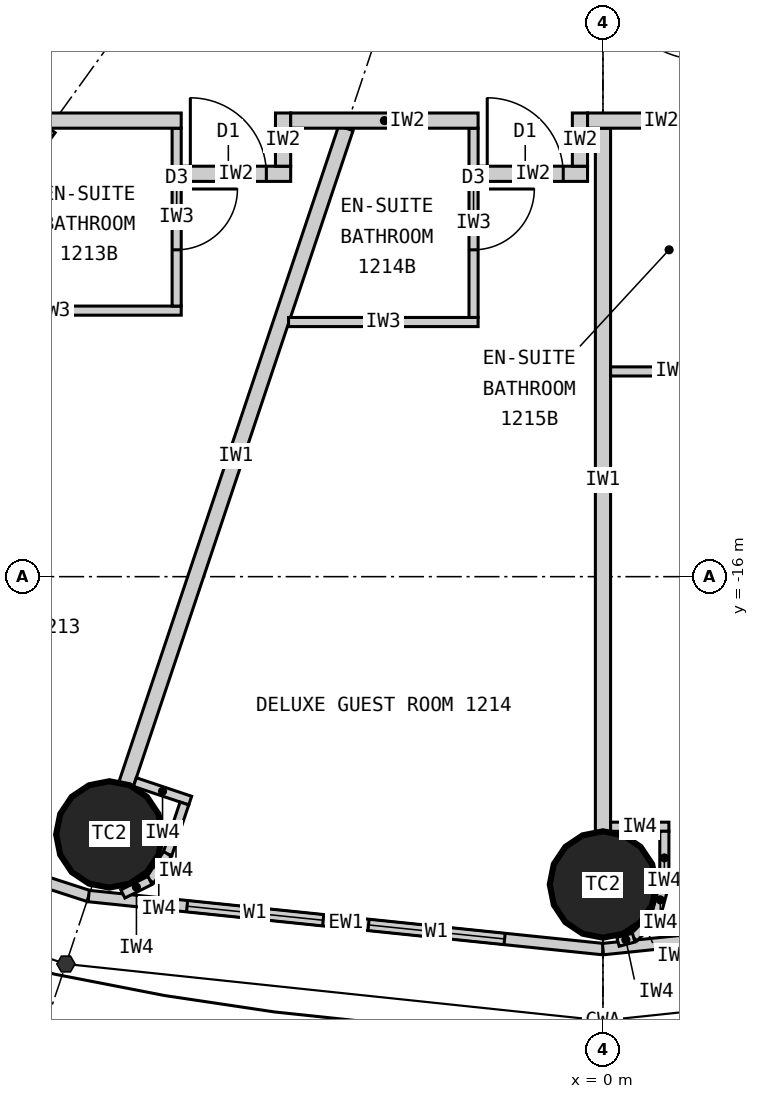
"""IFC4 building model, lengths in metres.
Left out: names, types, materials, properties, quantities, classifications, styles, units other than length and angle.
Written with IfcOpenShell. Run it as: python <this file> out.ifc"""

import sys

from ifc_helpers import new_model, si_unit, direction, frame, frame_2d, origin, origin_2d, place, context, subcontext, project, spatial, rectangle, circle, extrude, element, fill, save


model = new_model("IFC4")
c1 = context("Model", 3, precision=1e-05, world=origin(), true_north=direction((0.0, 1.0)))
c2 = subcontext(c1, "Body", "Model", "MODEL_VIEW")
j1 = project(units=[si_unit("LENGTHUNIT", "METRE"), si_unit("PLANEANGLEUNIT", "RADIAN")], contexts=[c1])
p1 = place(None, origin())
s1 = spatial("IfcSite", under=j1, at=p1, CompositionType="ELEMENT")
p2 = place(p1, origin())
s2 = spatial("IfcBuilding", under=s1, at=p2, CompositionType="ELEMENT")
p3 = place(p2, frame((0.0, 0.0, 54.0)))
s3 = spatial("IfcBuildingStorey", under=s2, at=p3, CompositionType="ELEMENT", Elevation=54.0)
for number, where, z_axis, x_axis in (
    (1, (-6.495, -19.391, 0.0), (0.0, 0.0, 1.0), (1.0, 0.0, 0.0)),
    (2, (0.0, -20.05, 0.0), (0.0, 0.0, 1.0), (1.0, 0.0, 0.0)),
):
    element("IfcColumn", number, at=place(p3, frame(where, z_axis=z_axis, x_axis=x_axis)), inside=s3, PredefinedType="COLUMN", context=c2, shape_type="SweptSolid", body=[
        extrude(circle(Radius=0.7, at=origin_2d()), origin(), (0.0, 0.0, 1.0), 3.3),
    ])
p4 = place(p3, frame((-13.096, -18.147, 0.0), z_axis=(0.0, 0.0, 1.0), x_axis=(0.951137534625, -0.308767534285, 0.0)))
e3 = element("IfcWall", 3, at=p4, inside=s3, PredefinedType="ELEMENTEDWALL", context=c2, shape_type="SweptSolid", body=[
    extrude(rectangle(XDim=6.655, YDim=0.15, at=frame_2d((3.328, 0.0))), origin(), (0.0, 0.0, 1.0), 3.12),
])
p5 = place(p4, frame((1.228, 0.0, 0.9)))
e4 = element("IfcOpeningElement", 4, at=p5, cuts=e3, PredefinedType="OPENING", context=c2, shape_type="SweptSolid", body=[
    extrude(rectangle(XDim=1.8, YDim=1.9, at=frame_2d((0.9, 0.95))), frame((0.0, 0.085, 0.0), z_axis=(0.0, -1.0, 0.0), x_axis=(1.0, 0.0, 0.0)), (0.0, 0.0, 1.0), 0.17),
])
p6 = place(p4, frame((3.628, 0.0, 0.9)))
e5 = element("IfcOpeningElement", 5, at=p6, cuts=e3, PredefinedType="OPENING", context=c2, shape_type="SweptSolid", body=[
    extrude(rectangle(XDim=1.8, YDim=1.9, at=frame_2d((0.9, 0.95))), frame((0.0, 0.085, 0.0), z_axis=(0.0, -1.0, 0.0), x_axis=(1.0, 0.0, 0.0)), (0.0, 0.0, 1.0), 0.17),
])
p7 = place(p3, frame((-6.766, -20.202, 0.0), z_axis=(0.0, 0.0, 1.0), x_axis=(0.994721394369, -0.102612609291, 0.0)))
e6 = element("IfcWall", 6, at=p7, inside=s3, PredefinedType="ELEMENTEDWALL", context=c2, shape_type="SweptSolid", body=[
    extrude(rectangle(XDim=6.802, YDim=0.15, at=frame_2d((3.401, 0.0))), origin(), (0.0, 0.0, 1.0), 3.12),
])
p8 = place(p7, frame((1.301, 0.0, 0.9)))
e7 = element("IfcOpeningElement", 7, at=p8, cuts=e6, PredefinedType="OPENING", context=c2, shape_type="SweptSolid", body=[
    extrude(rectangle(XDim=1.8, YDim=1.9, at=frame_2d((0.9, 0.95))), frame((0.0, 0.085, 0.0), z_axis=(0.0, -1.0, 0.0), x_axis=(1.0, 0.0, 0.0)), (0.0, 0.0, 1.0), 0.17),
])
p9 = place(p7, frame((3.701, 0.0, 0.9)))
e8 = element("IfcOpeningElement", 8, at=p9, cuts=e6, PredefinedType="OPENING", context=c2, shape_type="SweptSolid", body=[
    extrude(rectangle(XDim=1.8, YDim=1.9, at=frame_2d((0.9, 0.95))), frame((0.0, 0.085, 0.0), z_axis=(0.0, -1.0, 0.0), x_axis=(1.0, 0.0, 0.0)), (0.0, 0.0, 1.0), 0.17),
])
p10 = place(p3, frame((0.0, -20.9, 0.0), z_axis=(0.0, 0.0, 1.0), x_axis=(0.994721394369, 0.102612609291, 0.0)))
e9 = element("IfcWall", 9, at=p10, inside=s3, PredefinedType="ELEMENTEDWALL", context=c2, shape_type="SweptSolid", body=[
    extrude(rectangle(XDim=6.802, YDim=0.15, at=frame_2d((3.401, 0.0))), origin(), (0.0, 0.0, 1.0), 3.12),
])
p11 = place(p10, frame((1.301, 0.0, 0.9)))
e10 = element("IfcOpeningElement", 10, at=p11, cuts=e9, PredefinedType="OPENING", context=c2, shape_type="SweptSolid", body=[
    extrude(rectangle(XDim=1.8, YDim=1.9, at=frame_2d((0.9, 0.95))), frame((0.0, 0.085, 0.0), z_axis=(0.0, -1.0, 0.0), x_axis=(1.0, 0.0, 0.0)), (0.0, 0.0, 1.0), 0.17),
])
p12 = place(p10, frame((3.701, 0.0, 0.9)))
e11 = element("IfcOpeningElement", 11, at=p12, cuts=e9, PredefinedType="OPENING", context=c2, shape_type="SweptSolid", body=[
    extrude(rectangle(XDim=1.8, YDim=1.9, at=frame_2d((0.9, 0.95))), frame((0.0, 0.085, 0.0), z_axis=(0.0, -1.0, 0.0), x_axis=(1.0, 0.0, 0.0)), (0.0, 0.0, 1.0), 0.17),
])
p13 = place(p3, frame((-7.289, -10.1, 0.0), z_axis=(0.0, 0.0, 1.0), x_axis=(-0.585198353053, -0.810890182197, 0.0)))
e12 = element("IfcWall", 12, at=p13, inside=s3, PredefinedType="PARTITIONING", context=c2, shape_type="SweptSolid", body=[
    extrude(rectangle(XDim=8.36, YDim=0.2, at=frame_2d((4.18, 0.0))), origin(), (0.0, 0.0, 1.0), 2.32),
])
p14 = place(p3, frame((-3.383, -10.1, 0.0), z_axis=(0.0, 0.0, 1.0), x_axis=(-0.31759592231, -0.948226149256, 0.0)))
e13 = element("IfcWall", 13, at=p14, inside=s3, PredefinedType="PARTITIONING", context=c2, shape_type="SweptSolid", body=[
    extrude(rectangle(XDim=9.098, YDim=0.2, at=frame_2d((4.549, 0.0))), origin(), (0.0, 0.0, 1.0), 2.32),
])
p15 = place(p3, frame((0.0, -10.1, 0.0), z_axis=(0.0, 0.0, 1.0), x_axis=(0.0, -1.0, 0.0)))
e14 = element("IfcWall", 14, at=p15, inside=s3, PredefinedType="PARTITIONING", context=c2, shape_type="SweptSolid", body=[
    extrude(rectangle(XDim=9.25, YDim=0.2, at=frame_2d((4.625, 0.0))), origin(), (0.0, 0.0, 1.0), 2.32),
])
p16 = place(p3, frame((-8.921, -12.5, 0.0), z_axis=(0.0, 0.0, 1.0), x_axis=(1.0, 0.0, 0.0)))
e15 = element("IfcWall", 15, at=p16, inside=s3, PredefinedType="PARTITIONING", context=c2, shape_type="SweptSolid", body=[
    extrude(rectangle(XDim=3.372, YDim=0.12, at=frame_2d((1.686, 0.0))), origin(), (0.0, 0.0, 1.0), 3.12),
])
p17 = place(p3, frame((-5.609, -10.1, 0.0), z_axis=(0.0, 0.0, 1.0), x_axis=(0.0, -1.0, 0.0)))
e16 = element("IfcWall", 16, at=p17, inside=s3, PredefinedType="PARTITIONING", context=c2, shape_type="SweptSolid", body=[
    extrude(rectangle(XDim=2.34, YDim=0.12, at=frame_2d((1.17, 0.0))), origin(), (0.0, 0.0, 1.0), 3.12),
])
p18 = place(p17, frame((0.8, 0.0, 0.0)))
e17 = element("IfcOpeningElement", 17, at=p18, cuts=e16, PredefinedType="OPENING", context=c2, shape_type="SweptSolid", body=[
    extrude(rectangle(XDim=0.8, YDim=2.1, at=frame_2d((0.4, 1.05))), frame((0.0, 0.07, 0.0), z_axis=(0.0, -1.0, 0.0), x_axis=(1.0, 0.0, 0.0)), (0.0, 0.0, 1.0), 0.14),
])
p19 = place(p3, frame((-4.137, -12.65, 0.0), z_axis=(0.0, 0.0, 1.0), x_axis=(1.0, 0.0, 0.0)))
e18 = element("IfcWall", 18, at=p19, inside=s3, PredefinedType="PARTITIONING", context=c2, shape_type="SweptSolid", body=[
    extrude(rectangle(XDim=2.494, YDim=0.12, at=frame_2d((1.247, 0.0))), origin(), (0.0, 0.0, 1.0), 3.12),
])
p20 = place(p3, frame((-1.703, -10.1, 0.0), z_axis=(0.0, 0.0, 1.0), x_axis=(0.0, -1.0, 0.0)))
e19 = element("IfcWall", 19, at=p20, inside=s3, PredefinedType="PARTITIONING", context=c2, shape_type="SweptSolid", body=[
    extrude(rectangle(XDim=2.49, YDim=0.12, at=frame_2d((1.245, 0.0))), origin(), (0.0, 0.0, 1.0), 3.12),
])
p21 = place(p20, frame((0.8, 0.0, 0.0)))
e20 = element("IfcOpeningElement", 20, at=p21, cuts=e19, PredefinedType="OPENING", context=c2, shape_type="SweptSolid", body=[
    extrude(rectangle(XDim=0.8, YDim=2.1, at=frame_2d((0.4, 1.05))), frame((0.0, 0.07, 0.0), z_axis=(0.0, -1.0, 0.0), x_axis=(1.0, 0.0, 0.0)), (0.0, 0.0, 1.0), 0.14),
])
p22 = place(p3, frame((0.1, -13.3, 0.0), z_axis=(0.0, 0.0, 1.0), x_axis=(1.0, 0.0, 0.0)))
e21 = element("IfcWall", 21, at=p22, inside=s3, PredefinedType="PARTITIONING", context=c2, shape_type="SweptSolid", body=[
    extrude(rectangle(XDim=1.64, YDim=0.12, at=frame_2d((0.82, 0.0))), origin(), (0.0, 0.0, 1.0), 3.12),
])
p23 = place(p3, frame((-4.109, -10.7, 0.0), z_axis=(0.0, 0.0, 1.0), x_axis=(-1.0, 0.0, 0.0)))
e22 = element("IfcWall", 22, at=p23, inside=s3, PredefinedType="PARTITIONING", context=c2, shape_type="SweptSolid", body=[
    extrude(rectangle(XDim=1.44, YDim=0.2, at=frame_2d((0.72, 0.0))), origin(), (0.0, 0.0, 1.0), 3.12),
])
p24 = place(p23, frame((0.32, 0.0, 0.0)))
e23 = element("IfcOpeningElement", 23, at=p24, cuts=e22, PredefinedType="OPENING", context=c2, shape_type="SweptSolid", body=[
    extrude(rectangle(XDim=1.0, YDim=2.2, at=frame_2d((0.5, 1.1))), frame((0.0, 0.11, 0.0), z_axis=(0.0, -1.0, 0.0), x_axis=(1.0, 0.0, 0.0)), (0.0, 0.0, 1.0), 0.22),
])
p25 = place(p3, frame((-4.209, -9.9, 0.0), z_axis=(0.0, 0.0, 1.0), x_axis=(0.0, -1.0, 0.0)))
e24 = element("IfcWall", 24, at=p25, inside=s3, PredefinedType="PARTITIONING", context=c2, shape_type="SweptSolid", body=[
    extrude(rectangle(XDim=0.7, YDim=0.2, at=frame_2d((0.35, 0.0))), origin(), (0.0, 0.0, 1.0), 3.12),
])
p26 = place(p3, frame((-0.203, -10.7, 0.0), z_axis=(0.0, 0.0, 1.0), x_axis=(-1.0, 0.0, 0.0)))
e25 = element("IfcWall", 25, at=p26, inside=s3, PredefinedType="PARTITIONING", context=c2, shape_type="SweptSolid", body=[
    extrude(rectangle(XDim=1.44, YDim=0.2, at=frame_2d((0.72, 0.0))), origin(), (0.0, 0.0, 1.0), 3.12),
])
p27 = place(p26, frame((0.32, 0.0, 0.0)))
e26 = element("IfcOpeningElement", 26, at=p27, cuts=e25, PredefinedType="OPENING", context=c2, shape_type="SweptSolid", body=[
    extrude(rectangle(XDim=1.0, YDim=2.2, at=frame_2d((0.5, 1.1))), frame((0.0, 0.11, 0.0), z_axis=(0.0, -1.0, 0.0), x_axis=(1.0, 0.0, 0.0)), (0.0, 0.0, 1.0), 0.22),
])
p28 = place(p3, frame((-0.303, -9.9, 0.0), z_axis=(0.0, 0.0, 1.0), x_axis=(0.0, -1.0, 0.0)))
e27 = element("IfcWall", 27, at=p28, inside=s3, PredefinedType="PARTITIONING", context=c2, shape_type="SweptSolid", body=[
    extrude(rectangle(XDim=0.7, YDim=0.2, at=frame_2d((0.35, 0.0))), origin(), (0.0, 0.0, 1.0), 3.12),
])
p29 = place(p3, frame((1.74, -10.0, 0.0), z_axis=(0.0, 0.0, 1.0), x_axis=(-1.0, 0.0, 0.0)))
e28 = element("IfcWall", 28, at=p29, inside=s3, PredefinedType="PARTITIONING", context=c2, shape_type="SweptSolid", body=[
    extrude(rectangle(XDim=1.943, YDim=0.2, at=frame_2d((0.971, 0.0))), origin(), (0.0, 0.0, 1.0), 3.12),
])
p30 = place(p3, frame((-1.643, -10.0, 0.0), z_axis=(0.0, 0.0, 1.0), x_axis=(-1.0, 0.0, 0.0)))
e29 = element("IfcWall", 29, at=p30, inside=s3, PredefinedType="PARTITIONING", context=c2, shape_type="SweptSolid", body=[
    extrude(rectangle(XDim=2.466, YDim=0.2, at=frame_2d((1.233, 0.0))), origin(), (0.0, 0.0, 1.0), 3.12),
])
p31 = place(p3, frame((-5.549, -10.0, 0.0), z_axis=(0.0, 0.0, 1.0), x_axis=(-1.0, 0.0, 0.0)))
e30 = element("IfcWall", 30, at=p31, inside=s3, PredefinedType="PARTITIONING", context=c2, shape_type="SweptSolid", body=[
    extrude(rectangle(XDim=3.896, YDim=0.2, at=frame_2d((1.948, 0.0))), origin(), (0.0, 0.0, 1.0), 3.12),
])
p32 = place(p3, frame((-6.159, -18.702, 0.0), z_axis=(0.0, 0.0, 1.0), x_axis=(0.948173154049, -0.31775410295, 0.0)))
e31 = element("IfcWall", 31, at=p32, inside=s3, PredefinedType="PARTITIONING", context=c2, shape_type="SweptSolid", body=[
    extrude(rectangle(XDim=0.768, YDim=0.12, at=frame_2d((0.384, 0.0))), origin(), (0.0, 0.0, 1.0), 3.12),
])
p33 = place(p3, frame((-5.507, -18.984, 0.0), z_axis=(0.0, 0.0, 1.0), x_axis=(-0.317692050622, -0.948193946918, 0.0)))
e32 = element("IfcWall", 32, at=p33, inside=s3, PredefinedType="PARTITIONING", context=c2, shape_type="SweptSolid", body=[
    extrude(rectangle(XDim=0.7, YDim=0.12, at=frame_2d((0.35, 0.0))), origin(), (0.0, 0.0, 1.0), 3.12),
])
p34 = place(p3, frame((-5.729, -19.648, 0.0), z_axis=(0.0, 0.0, 1.0), x_axis=(-0.552135764955, -0.833754218615, 0.0)))
e33 = element("IfcWall", 33, at=p34, inside=s3, PredefinedType="PARTITIONING", context=c2, shape_type="SweptSolid", body=[
    extrude(rectangle(XDim=0.418, YDim=0.12, at=frame_2d((0.209, 0.0))), origin(), (0.0, 0.0, 1.0), 3.12),
])
p35 = place(p3, frame((-5.96, -19.996, 0.0), z_axis=(0.0, 0.0, 1.0), x_axis=(-0.895160725913, -0.445743507842, 0.0)))
e34 = element("IfcWall", 34, at=p35, inside=s3, PredefinedType="PARTITIONING", context=c2, shape_type="SweptSolid", body=[
    extrude(rectangle(XDim=0.399, YDim=0.12, at=frame_2d((0.199, 0.0))), origin(), (0.0, 0.0, 1.0), 3.12),
])
p36 = place(p3, frame((0.1, -19.29, 0.0), z_axis=(0.0, 0.0, 1.0), x_axis=(1.0, 0.0, 0.0)))
e35 = element("IfcWall", 35, at=p36, inside=s3, PredefinedType="PARTITIONING", context=c2, shape_type="SweptSolid", body=[
    extrude(rectangle(XDim=0.767, YDim=0.12, at=frame_2d((0.384, 0.0))), origin(), (0.0, 0.0, 1.0), 3.12),
])
p37 = place(p3, frame((0.808, -19.35, 0.0), z_axis=(0.0, 0.0, 1.0), x_axis=(0.0, -1.0, 0.0)))
e36 = element("IfcWall", 36, at=p37, inside=s3, PredefinedType="PARTITIONING", context=c2, shape_type="SweptSolid", body=[
    extrude(rectangle(XDim=0.7, YDim=0.12, at=frame_2d((0.35, 0.0))), origin(), (0.0, 0.0, 1.0), 3.12),
])
p38 = place(p3, frame((0.808, -20.05, 0.0), z_axis=(0.0, 0.0, 1.0), x_axis=(-0.2592614205, -0.965807183573, 0.0)))
e37 = element("IfcWall", 37, at=p38, inside=s3, PredefinedType="PARTITIONING", context=c2, shape_type="SweptSolid", body=[
    extrude(rectangle(XDim=0.418, YDim=0.12, at=frame_2d((0.209, 0.0))), origin(), (0.0, 0.0, 1.0), 3.12),
])
p39 = place(p3, frame((0.699, -20.454, 0.0), z_axis=(0.0, 0.0, 1.0), x_axis=(-0.707106781187, -0.707106781187, 0.0)))
e38 = element("IfcWall", 38, at=p39, inside=s3, PredefinedType="PARTITIONING", context=c2, shape_type="SweptSolid", body=[
    extrude(rectangle(XDim=0.418, YDim=0.12, at=frame_2d((0.209, 0.0))), origin(), (0.0, 0.0, 1.0), 3.12),
])
p40 = place(p3, frame((0.404, -20.749, 0.0), z_axis=(0.0, 0.0, 1.0), x_axis=(-0.965759066438, -0.25944060128, 0.0)))
e39 = element("IfcWall", 39, at=p40, inside=s3, PredefinedType="PARTITIONING", context=c2, shape_type="SweptSolid", body=[
    extrude(rectangle(XDim=0.214, YDim=0.12, at=frame_2d((0.107, 0.0))), origin(), (0.0, 0.0, 1.0), 3.12),
])
p41 = place(p8, origin())
e40 = element("IfcWindow", 40, at=p41, inside=s3, PartitioningType="SINGLE_PANEL", PredefinedType="WINDOW", context=c2, shape_type="SweptSolid", body=[
    extrude(rectangle(XDim=1.8, YDim=1.9, at=frame_2d((0.9, 0.95))), frame((0.0, 0.03, 0.0), z_axis=(0.0, -1.0, 0.0), x_axis=(1.0, 0.0, 0.0)), (0.0, 0.0, 1.0), 0.06),
])
fill(e7, e40)
p42 = place(p9, origin())
e41 = element("IfcWindow", 41, at=p42, inside=s3, PartitioningType="SINGLE_PANEL", PredefinedType="WINDOW", context=c2, shape_type="SweptSolid", body=[
    extrude(rectangle(XDim=1.8, YDim=1.9, at=frame_2d((0.9, 0.95))), frame((0.0, 0.03, 0.0), z_axis=(0.0, -1.0, 0.0), x_axis=(1.0, 0.0, 0.0)), (0.0, 0.0, 1.0), 0.06),
])
fill(e8, e41)
p43 = place(p18, origin())
e42 = element("IfcDoor", 42, at=p43, inside=s3, OperationType="SINGLE_SWING_LEFT", PredefinedType="DOOR", context=c2, shape_type="SweptSolid", body=[
    extrude(rectangle(XDim=0.8, YDim=2.1, at=frame_2d((0.4, 1.05))), frame((0.0, 0.025, 0.0), z_axis=(0.0, -1.0, 0.0), x_axis=(1.0, 0.0, 0.0)), (0.0, 0.0, 1.0), 0.05),
])
fill(e17, e42)
p44 = place(p24, origin())
e43 = element("IfcDoor", 43, at=p44, inside=s3, OperationType="SINGLE_SWING_RIGHT", PredefinedType="DOOR", context=c2, shape_type="SweptSolid", body=[
    extrude(rectangle(XDim=1.0, YDim=2.2, at=frame_2d((0.5, 1.1))), frame((0.0, 0.025, 0.0), z_axis=(0.0, -1.0, 0.0), x_axis=(1.0, 0.0, 0.0)), (0.0, 0.0, 1.0), 0.05),
])
fill(e23, e43)
p45 = place(p21, origin())
e44 = element("IfcDoor", 44, at=p45, inside=s3, OperationType="SINGLE_SWING_LEFT", PredefinedType="DOOR", context=c2, shape_type="SweptSolid", body=[
    extrude(rectangle(XDim=0.8, YDim=2.1, at=frame_2d((0.4, 1.05))), frame((0.0, 0.025, 0.0), z_axis=(0.0, -1.0, 0.0), x_axis=(1.0, 0.0, 0.0)), (0.0, 0.0, 1.0), 0.05),
])
fill(e20, e44)
p46 = place(p27, origin())
e45 = element("IfcDoor", 45, at=p46, inside=s3, OperationType="SINGLE_SWING_RIGHT", PredefinedType="DOOR", context=c2, shape_type="SweptSolid", body=[
    extrude(rectangle(XDim=1.0, YDim=2.2, at=frame_2d((0.5, 1.1))), frame((0.0, 0.025, 0.0), z_axis=(0.0, -1.0, 0.0), x_axis=(1.0, 0.0, 0.0)), (0.0, 0.0, 1.0), 0.05),
])
fill(e26, e45)
save(model, sys.argv[1])
